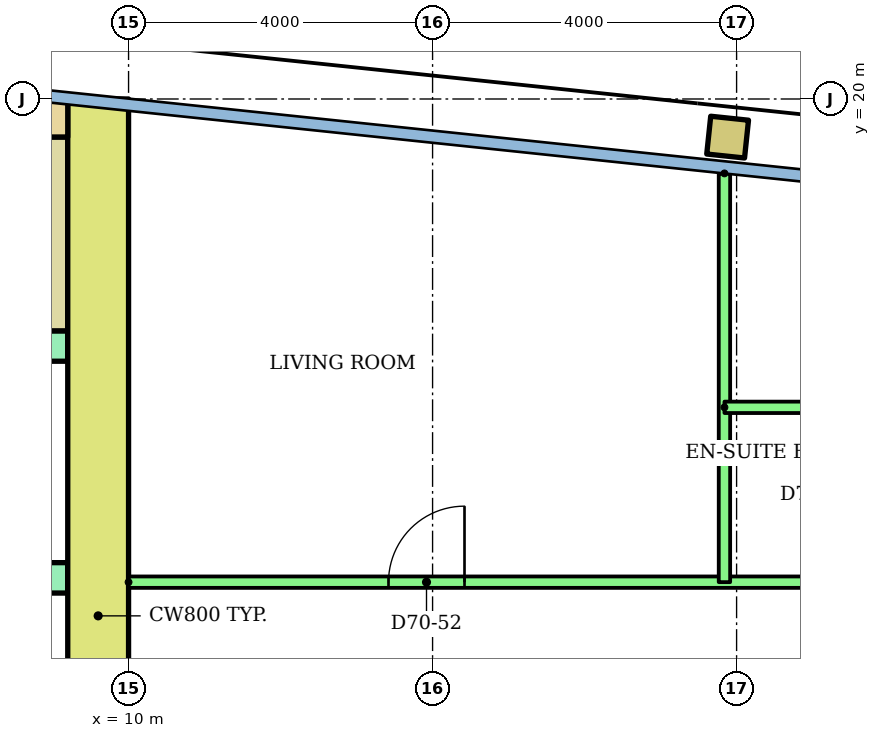
"""IFC4 building model, lengths in metres.
Left out: names, types, materials, properties, quantities, classifications, styles, units other than length and angle.
Written with IfcOpenShell. Run it as: python <this file> out.ifc"""

import sys

from ifc_helpers import new_model, si_unit, direction, frame, frame_2d, origin, origin_2d, place, context, subcontext, project, spatial, rectangle, hollow_rectangle, extrude, element, fill, save


model = new_model("IFC4")
c1 = context("Model", 3, precision=1e-05, world=origin(), true_north=direction((0.0, 1.0)))
c2 = subcontext(c1, "Body", "Model", "MODEL_VIEW")
j1 = project(units=[si_unit("LENGTHUNIT", "METRE"), si_unit("PLANEANGLEUNIT", "RADIAN")], contexts=[c1])
p1 = place(None, origin())
s1 = spatial("IfcSite", under=j1, at=p1, CompositionType="ELEMENT")
p2 = place(p1, origin())
s2 = spatial("IfcBuilding", under=s1, at=p2, CompositionType="ELEMENT")
p3 = place(p2, frame((0.0, 0.0, 269.1)))
s3 = spatial("IfcBuildingStorey", under=s2, at=p3, CompositionType="ELEMENT", Elevation=269.1)
p4 = place(p3, frame((17.882, 19.498, 0.0), z_axis=(0.0, 0.0, 1.0), x_axis=(0.994521895368, -0.104528463268, 0.0)))
e1 = element("IfcColumn", 1, at=p4, inside=s3, PredefinedType="COLUMN", context=c2, shape_type="SweptSolid", body=[
    extrude(hollow_rectangle(XDim=0.5, YDim=0.5, WallThickness=0.025, at=origin_2d()), origin(), (0.0, 0.0, 1.0), 3.2),
])
p5 = place(p3, frame((9.6, 6.4, 0.0), z_axis=(0.0, 0.0, 1.0), x_axis=(0.0, 1.0, 0.0)))
e2 = element("IfcWall", 2, at=p5, inside=s3, PredefinedType="SHEAR", context=c2, shape_type="SweptSolid", body=[
    extrude(rectangle(XDim=13.6, YDim=0.8, at=frame_2d((6.8, 0.0))), origin(), (0.0, 0.0, 1.0), 2.92),
])
p6 = place(p3, frame((-9.2, 19.75, 0.0)))
e3 = element("IfcWall", 3, at=p6, inside=s3, PredefinedType="SHEAR", context=c2, shape_type="SweptSolid", body=[
    extrude(rectangle(XDim=18.4, YDim=0.5, at=frame_2d((9.2, 0.0))), origin(), (0.0, 0.0, 1.0), 2.92),
])
p7 = place(p3, frame((1.2, 13.7, 0.0)))
e4 = element("IfcWall", 4, at=p7, inside=s3, PredefinedType="SHEAR", context=c2, shape_type="SweptSolid", body=[
    extrude(rectangle(XDim=8.0, YDim=0.4, at=frame_2d((4.0, 0.0))), origin(), (0.0, 0.0, 1.0), 2.92),
])
p8 = place(p3, frame((-9.2, 16.75, 0.0)))
e5 = element("IfcWall", 5, at=p8, inside=s3, PredefinedType="SHEAR", context=c2, shape_type="SweptSolid", body=[
    extrude(rectangle(XDim=18.4, YDim=0.4, at=frame_2d((9.2, 0.0))), origin(), (0.0, 0.0, 1.0), 2.92),
])
p9 = place(p8, frame((0.1, 0.0, 0.0)))
e6 = element("IfcOpeningElement", 6, at=p9, cuts=e5, PredefinedType="OPENING", context=c2, shape_type="SweptSolid", body=[
    extrude(rectangle(XDim=0.95, YDim=2.1, at=frame_2d((0.475, 1.05))), frame((0.0, 0.21, 0.0), z_axis=(0.0, -1.0, 0.0), x_axis=(1.0, 0.0, 0.0)), (0.0, 0.0, 1.0), 0.42),
])
p10 = place(p8, frame((6.1, 0.0, 0.0)))
e7 = element("IfcOpeningElement", 7, at=p10, cuts=e5, PredefinedType="OPENING", context=c2, shape_type="SweptSolid", body=[
    extrude(rectangle(XDim=0.95, YDim=2.1, at=frame_2d((0.475, 1.05))), frame((0.0, 0.21, 0.0), z_axis=(0.0, -1.0, 0.0), x_axis=(1.0, 0.0, 0.0)), (0.0, 0.0, 1.0), 0.42),
])
p11 = place(p8, frame((12.1, 0.0, 0.0)))
e8 = element("IfcOpeningElement", 8, at=p11, cuts=e5, PredefinedType="OPENING", context=c2, shape_type="SweptSolid", body=[
    extrude(rectangle(XDim=0.95, YDim=2.1, at=frame_2d((0.475, 1.05))), frame((0.0, 0.21, 0.0), z_axis=(0.0, -1.0, 0.0), x_axis=(1.0, 0.0, 0.0)), (0.0, 0.0, 1.0), 0.42),
])
p12 = place(p3, frame((8.75, 16.95, 0.0), z_axis=(0.0, 0.0, 1.0), x_axis=(0.0, 1.0, 0.0)))
e9 = element("IfcWall", 9, at=p12, inside=s3, PredefinedType="SHEAR", context=c2, shape_type="SweptSolid", body=[
    extrude(rectangle(XDim=2.55, YDim=0.9, at=frame_2d((1.275, 0.0))), origin(), (0.0, 0.0, 1.0), 2.92),
])
p13 = place(p3, frame((10.0, 13.643, 0.0)))
e10 = element("IfcWall", 10, at=p13, inside=s3, PredefinedType="PARTITIONING", context=c2, shape_type="SweptSolid", body=[
    extrude(rectangle(XDim=20.641, YDim=0.15, at=frame_2d((10.32, 0.0))), origin(), (0.0, 0.0, 1.0), 2.4),
])
p14 = place(p13, frame((3.42, 0.0, 0.0)))
e11 = element("IfcOpeningElement", 11, at=p14, cuts=e10, PredefinedType="OPENING", context=c2, shape_type="SweptSolid", body=[
    extrude(rectangle(XDim=1.0, YDim=2.1, at=frame_2d((0.5, 1.05))), frame((0.0, 0.085, 0.0), z_axis=(0.0, -1.0, 0.0), x_axis=(1.0, 0.0, 0.0)), (0.0, 0.0, 1.0), 0.17),
])
p15 = place(p13, frame((11.368, 0.0, 0.0)))
e12 = element("IfcOpeningElement", 12, at=p15, cuts=e10, PredefinedType="OPENING", context=c2, shape_type="SweptSolid", body=[
    extrude(rectangle(XDim=0.9, YDim=2.1, at=frame_2d((0.45, 1.05))), frame((0.0, 0.085, 0.0), z_axis=(0.0, -1.0, 0.0), x_axis=(1.0, 0.0, 0.0)), (0.0, 0.0, 1.0), 0.17),
])
p16 = place(p13, frame((18.477, 0.0, 0.0)))
e13 = element("IfcOpeningElement", 13, at=p16, cuts=e10, PredefinedType="OPENING", context=c2, shape_type="SweptSolid", body=[
    extrude(rectangle(XDim=0.9, YDim=2.1, at=frame_2d((0.45, 1.05))), frame((0.0, 0.085, 0.0), z_axis=(0.0, -1.0, 0.0), x_axis=(1.0, 0.0, 0.0)), (0.0, 0.0, 1.0), 0.17),
])
p17 = place(p3, frame((17.84, 19.021, 0.0), z_axis=(0.0, 0.0, 1.0), x_axis=(0.0, -1.0, 0.0)))
e14 = element("IfcWall", 14, at=p17, inside=s3, PredefinedType="PARTITIONING", context=c2, shape_type="SweptSolid", body=[
    extrude(rectangle(XDim=5.378, YDim=0.15, at=frame_2d((2.689, 0.0))), origin(), (0.0, 0.0, 1.0), 2.4),
])
p18 = place(p3, frame((17.84, 15.943, 0.0)))
e15 = element("IfcWall", 15, at=p18, inside=s3, PredefinedType="PARTITIONING", context=c2, shape_type="SweptSolid", body=[
    extrude(rectangle(XDim=2.0, YDim=0.15, at=frame_2d((1.0, 0.0))), origin(), (0.0, 0.0, 1.0), 2.4),
])
p19 = place(p14, origin())
e16 = element("IfcDoor", 16, at=p19, inside=s3, OperationType="SINGLE_SWING_RIGHT", PredefinedType="DOOR", context=c2, shape_type="SweptSolid", body=[
    extrude(rectangle(XDim=1.0, YDim=2.1, at=frame_2d((0.5, 1.05))), frame((0.0, 0.025, 0.0), z_axis=(0.0, -1.0, 0.0), x_axis=(1.0, 0.0, 0.0)), (0.0, 0.0, 1.0), 0.05),
])
fill(e11, e16)
save(model, sys.argv[1])
